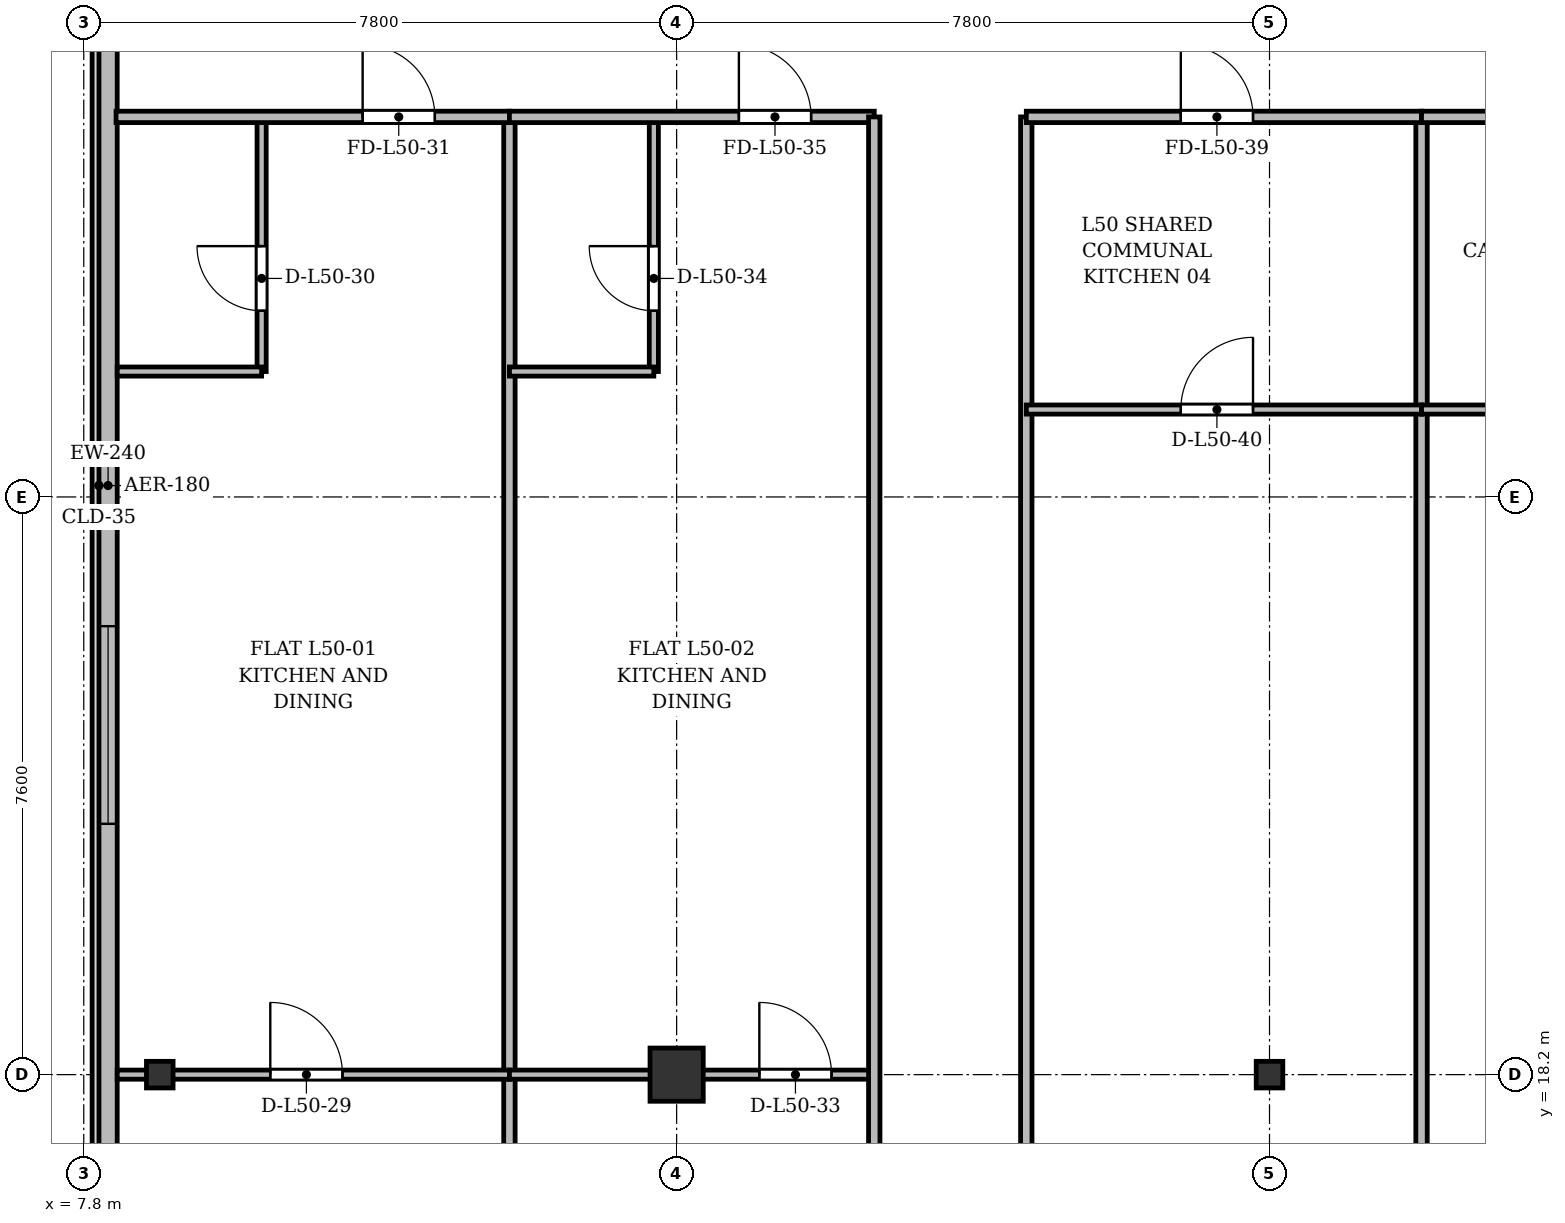
"""IFC4 building model, lengths in metres.
Left out: names, types, materials, properties, quantities, classifications, styles, units other than length and angle.
Written with IfcOpenShell. Run it as: python <this file> out.ifc"""

import sys

from ifc_helpers import new_model, si_unit, direction, frame, frame_2d, origin, origin_2d, place, context, subcontext, project, spatial, rectangle, i_section, extrude, source, transform, mapped, element, fill, save


model = new_model("IFC4")
c1 = context("Model", 3, precision=1e-05, world=origin(), true_north=direction((0.0, 1.0)))
c2 = subcontext(c1, "Body", "Model", "MODEL_VIEW")
j1 = project(units=[si_unit("LENGTHUNIT", "METRE"), si_unit("PLANEANGLEUNIT", "RADIAN")], contexts=[c1])
p1 = place(None, origin())
s1 = spatial("IfcSite", under=j1, at=p1, CompositionType="ELEMENT")
p2 = place(p1, origin())
s2 = spatial("IfcBuilding", under=s1, at=p2, CompositionType="ELEMENT")
p3 = place(p2, frame((0.0, 0.0, 194.1)))
s3 = spatial("IfcBuildingStorey", under=s2, at=p3, CompositionType="ELEMENT", Elevation=194.1)
m1 = source(origin(), c2, "Body", "SweptSolid", [
    extrude(i_section(OverallWidth=0.35, OverallDepth=0.35, WebThickness=0.018, FlangeThickness=0.028, at=origin_2d()), origin(), (0.0, 0.0, 1.0), 3.6),
])
p4 = place(p3, frame((8.8, 18.2, 0.0), z_axis=(0.0, 0.0, 1.0), x_axis=(1.0, 0.0, 0.0)))
e1 = element("IfcColumn", 1, at=p4, inside=s3, PredefinedType="COLUMN", context=c2, shape_type="MappedRepresentation", body=[
    mapped(m1, transform((0.0, 0.0, 0.0), x_axis=(1.0, 0.0, 0.0), y_axis=(0.0, 1.0, 0.0), z_axis=(0.0, 0.0, 1.0), scale=1.0)),
])
m2 = source(origin(), c2, "Body", "SweptSolid", [
    extrude(rectangle(XDim=0.7, YDim=0.7, at=origin_2d()), origin(), (0.0, 0.0, 1.0), 3.6),
])
p5 = place(p3, frame((15.6, 18.2, 0.0), z_axis=(0.0, 0.0, 1.0), x_axis=(1.0, 0.0, 0.0)))
e2 = element("IfcColumn", 2, at=p5, inside=s3, PredefinedType="COLUMN", context=c2, shape_type="MappedRepresentation", body=[
    mapped(m2, transform((0.0, 0.0, 0.0), x_axis=(1.0, 0.0, 0.0), y_axis=(0.0, 1.0, 0.0), z_axis=(0.0, 0.0, 1.0), scale=1.0)),
])
p6 = place(p3, frame((23.4, 18.2, 0.0), z_axis=(0.0, 0.0, 1.0), x_axis=(1.0, 0.0, 0.0)))
e3 = element("IfcColumn", 3, at=p6, inside=s3, PredefinedType="COLUMN", context=c2, shape_type="MappedRepresentation", body=[
    mapped(m1, transform((0.0, 0.0, 0.0), x_axis=(1.0, 0.0, 0.0), y_axis=(0.0, 1.0, 0.0), z_axis=(0.0, 0.0, 1.0), scale=1.0)),
])
p7 = place(p3, frame((8.12, 6.4, 0.0), z_axis=(0.0, 0.0, 1.0), x_axis=(0.0, 1.0, 0.0)))
e4 = element("IfcWall", 4, at=p7, inside=s3, PredefinedType="SOLIDWALL", context=c2, shape_type="SweptSolid", body=[
    extrude(rectangle(XDim=39.1, YDim=0.24, at=frame_2d((19.55, 0.0))), origin(), (0.0, 0.0, 1.0), 3.36),
])
p8 = place(p7, frame((1.45, 0.0, 0.92)))
e5 = element("IfcOpeningElement", 5, at=p8, cuts=e4, PredefinedType="OPENING", context=c2, shape_type="SweptSolid", body=[
    extrude(rectangle(XDim=1.2, YDim=1.65, at=frame_2d((0.6, 0.825))), frame((0.0, 0.13, 0.0), z_axis=(0.0, -1.0, 0.0), x_axis=(1.0, 0.0, 0.0)), (0.0, 0.0, 1.0), 0.26),
])
p9 = place(p7, frame((3.7, 0.0, 0.92)))
e6 = element("IfcOpeningElement", 6, at=p9, cuts=e4, PredefinedType="OPENING", context=c2, shape_type="SweptSolid", body=[
    extrude(rectangle(XDim=2.6, YDim=1.9, at=frame_2d((1.3, 0.95))), frame((0.0, 0.13, 0.0), z_axis=(0.0, -1.0, 0.0), x_axis=(1.0, 0.0, 0.0)), (0.0, 0.0, 1.0), 0.26),
])
p10 = place(p7, frame((7.9, 0.0, 0.92)))
e7 = element("IfcOpeningElement", 7, at=p10, cuts=e4, PredefinedType="OPENING", context=c2, shape_type="SweptSolid", body=[
    extrude(rectangle(XDim=2.6, YDim=1.9, at=frame_2d((1.3, 0.95))), frame((0.0, 0.13, 0.0), z_axis=(0.0, -1.0, 0.0), x_axis=(1.0, 0.0, 0.0)), (0.0, 0.0, 1.0), 0.26),
])
p11 = place(p7, frame((15.1, 0.0, 0.92)))
e8 = element("IfcOpeningElement", 8, at=p11, cuts=e4, PredefinedType="OPENING", context=c2, shape_type="SweptSolid", body=[
    extrude(rectangle(XDim=2.6, YDim=1.9, at=frame_2d((1.3, 0.95))), frame((0.0, 0.13, 0.0), z_axis=(0.0, -1.0, 0.0), x_axis=(1.0, 0.0, 0.0)), (0.0, 0.0, 1.0), 0.26),
])
p12 = place(p7, frame((33.4, 0.0, 0.92)))
e9 = element("IfcOpeningElement", 9, at=p12, cuts=e4, PredefinedType="OPENING", context=c2, shape_type="SweptSolid", body=[
    extrude(rectangle(XDim=1.2, YDim=1.65, at=frame_2d((0.6, 0.825))), frame((0.0, 0.13, 0.0), z_axis=(0.0, -1.0, 0.0), x_axis=(1.0, 0.0, 0.0)), (0.0, 0.0, 1.0), 0.26),
])
p13 = place(p7, frame((36.75, 0.0, 0.92)))
e10 = element("IfcOpeningElement", 10, at=p13, cuts=e4, PredefinedType="OPENING", context=c2, shape_type="SweptSolid", body=[
    extrude(rectangle(XDim=1.2, YDim=1.65, at=frame_2d((0.6, 0.825))), frame((0.0, 0.13, 0.0), z_axis=(0.0, -1.0, 0.0), x_axis=(1.0, 0.0, 0.0)), (0.0, 0.0, 1.0), 0.26),
])
for number, where, z_axis, x_axis in (
    (11, (13.4, 3.625, 0.0), (0.0, 0.0, 1.0), (0.0, 1.0, 0.0)),
    (12, (25.4, 3.625, 0.0), (0.0, 0.0, 1.0), (0.0, 1.0, 0.0)),
):
    element("IfcWall", number, at=place(p3, frame(where, z_axis=z_axis, x_axis=x_axis)), inside=s3, PredefinedType="PARTITIONING", context=c2, shape_type="SweptSolid", body=[
        extrude(rectangle(XDim=27.175, YDim=0.15, at=frame_2d((13.587, 0.0))), origin(), (0.0, 0.0, 1.0), 2.91),
    ])
p14 = place(p3, frame((8.24, 18.2, 0.0), z_axis=(0.0, 0.0, 1.0), x_axis=(1.0, 0.0, 0.0)))
e13 = element("IfcWall", 13, at=p14, inside=s3, PredefinedType="PARTITIONING", context=c2, shape_type="SweptSolid", body=[
    extrude(rectangle(XDim=5.16, YDim=0.12, at=frame_2d((2.58, 0.0))), origin(), (0.0, 0.0, 1.0), 2.91),
])
p15 = place(p14, frame((2.014, 0.0, 0.0)))
e14 = element("IfcOpeningElement", 14, at=p15, cuts=e13, PredefinedType="OPENING", context=c2, shape_type="SweptSolid", body=[
    extrude(rectangle(XDim=0.95, YDim=2.15, at=frame_2d((0.475, 1.075))), frame((0.0, 0.07, 0.0), z_axis=(0.0, -1.0, 0.0), x_axis=(1.0, 0.0, 0.0)), (0.0, 0.0, 1.0), 0.14),
])
p16 = place(p3, frame((10.14, 27.45, 0.0), z_axis=(0.0, 0.0, 1.0), x_axis=(0.0, 1.0, 0.0)))
e15 = element("IfcWall", 15, at=p16, inside=s3, PredefinedType="PARTITIONING", context=c2, shape_type="SweptSolid", body=[
    extrude(rectangle(XDim=3.35, YDim=0.12, at=frame_2d((1.675, 0.0))), origin(), (0.0, 0.0, 1.0), 3.36),
])
p17 = place(p16, frame((0.8, 0.0, 0.0)))
e16 = element("IfcOpeningElement", 16, at=p17, cuts=e15, PredefinedType="OPENING", context=c2, shape_type="SweptSolid", body=[
    extrude(rectangle(XDim=0.85, YDim=2.1, at=frame_2d((0.425, 1.05))), frame((0.0, 0.07, 0.0), z_axis=(0.0, -1.0, 0.0), x_axis=(1.0, 0.0, 0.0)), (0.0, 0.0, 1.0), 0.14),
])
p18 = place(p3, frame((8.24, 27.45, 0.0), z_axis=(0.0, 0.0, 1.0), x_axis=(1.0, 0.0, 0.0)))
e17 = element("IfcWall", 17, at=p18, inside=s3, PredefinedType="PARTITIONING", context=c2, shape_type="SweptSolid", body=[
    extrude(rectangle(XDim=1.9, YDim=0.12, at=frame_2d((0.95, 0.0))), origin(), (0.0, 0.0, 1.0), 2.86),
])
p19 = place(p3, frame((8.225, 30.8, 0.0), z_axis=(0.0, 0.0, 1.0), x_axis=(1.0, 0.0, 0.0)))
e18 = element("IfcWall", 18, at=p19, inside=s3, PredefinedType="PARTITIONING", context=c2, shape_type="SweptSolid", body=[
    extrude(rectangle(XDim=5.175, YDim=0.15, at=frame_2d((2.587, 0.0))), origin(), (0.0, 0.0, 1.0), 2.86),
])
p20 = place(p19, frame((3.244, 0.0, 0.0)))
e19 = element("IfcOpeningElement", 19, at=p20, cuts=e18, PredefinedType="OPENING", context=c2, shape_type="SweptSolid", body=[
    extrude(rectangle(XDim=0.95, YDim=2.15, at=frame_2d((0.475, 1.075))), frame((0.0, 0.085, 0.0), z_axis=(0.0, -1.0, 0.0), x_axis=(1.0, 0.0, 0.0)), (0.0, 0.0, 1.0), 0.17),
])
p21 = place(p3, frame((13.4, 18.2, 0.0), z_axis=(0.0, 0.0, 1.0), x_axis=(1.0, 0.0, 0.0)))
e20 = element("IfcWall", 20, at=p21, inside=s3, PredefinedType="PARTITIONING", context=c2, shape_type="SweptSolid", body=[
    extrude(rectangle(XDim=4.8, YDim=0.12, at=frame_2d((2.4, 0.0))), origin(), (0.0, 0.0, 1.0), 2.91),
])
p22 = place(p21, frame((3.288, 0.0, 0.0)))
e21 = element("IfcOpeningElement", 21, at=p22, cuts=e20, PredefinedType="OPENING", context=c2, shape_type="SweptSolid", body=[
    extrude(rectangle(XDim=0.95, YDim=2.15, at=frame_2d((0.475, 1.075))), frame((0.0, 0.07, 0.0), z_axis=(0.0, -1.0, 0.0), x_axis=(1.0, 0.0, 0.0)), (0.0, 0.0, 1.0), 0.14),
])
p23 = place(p3, frame((15.3, 27.45, 0.0), z_axis=(0.0, 0.0, 1.0), x_axis=(0.0, 1.0, 0.0)))
e22 = element("IfcWall", 22, at=p23, inside=s3, PredefinedType="PARTITIONING", context=c2, shape_type="SweptSolid", body=[
    extrude(rectangle(XDim=3.35, YDim=0.12, at=frame_2d((1.675, 0.0))), origin(), (0.0, 0.0, 1.0), 3.36),
])
p24 = place(p23, frame((0.8, 0.0, 0.0)))
e23 = element("IfcOpeningElement", 23, at=p24, cuts=e22, PredefinedType="OPENING", context=c2, shape_type="SweptSolid", body=[
    extrude(rectangle(XDim=0.85, YDim=2.1, at=frame_2d((0.425, 1.05))), frame((0.0, 0.07, 0.0), z_axis=(0.0, -1.0, 0.0), x_axis=(1.0, 0.0, 0.0)), (0.0, 0.0, 1.0), 0.14),
])
p25 = place(p3, frame((13.4, 27.45, 0.0), z_axis=(0.0, 0.0, 1.0), x_axis=(1.0, 0.0, 0.0)))
e24 = element("IfcWall", 24, at=p25, inside=s3, PredefinedType="PARTITIONING", context=c2, shape_type="SweptSolid", body=[
    extrude(rectangle(XDim=1.9, YDim=0.12, at=frame_2d((0.95, 0.0))), origin(), (0.0, 0.0, 1.0), 3.36),
])
p26 = place(p3, frame((13.4, 30.8, 0.0), z_axis=(0.0, 0.0, 1.0), x_axis=(1.0, 0.0, 0.0)))
e25 = element("IfcWall", 25, at=p26, inside=s3, PredefinedType="PARTITIONING", context=c2, shape_type="SweptSolid", body=[
    extrude(rectangle(XDim=4.8, YDim=0.15, at=frame_2d((2.4, 0.0))), origin(), (0.0, 0.0, 1.0), 2.86),
])
p27 = place(p26, frame((3.019, 0.0, 0.0)))
e26 = element("IfcOpeningElement", 26, at=p27, cuts=e25, PredefinedType="OPENING", context=c2, shape_type="SweptSolid", body=[
    extrude(rectangle(XDim=0.95, YDim=2.15, at=frame_2d((0.475, 1.075))), frame((0.0, 0.085, 0.0), z_axis=(0.0, -1.0, 0.0), x_axis=(1.0, 0.0, 0.0)), (0.0, 0.0, 1.0), 0.17),
])
for number, where, z_axis, x_axis in (
    (27, (18.2, 3.625, 0.0), (0.0, 0.0, 1.0), (0.0, 1.0, 0.0)),
    (28, (20.2, 3.625, 0.0), (0.0, 0.0, 1.0), (0.0, 1.0, 0.0)),
):
    element("IfcWall", number, at=place(p3, frame(where, z_axis=z_axis, x_axis=x_axis)), inside=s3, PredefinedType="PARTITIONING", context=c2, shape_type="SweptSolid", body=[
        extrude(rectangle(XDim=27.175, YDim=0.15, at=frame_2d((13.587, 0.0))), origin(), (0.0, 0.0, 1.0), 2.91),
    ])
p28 = place(p3, frame((20.2, 30.8, 0.0), z_axis=(0.0, 0.0, 1.0), x_axis=(1.0, 0.0, 0.0)))
e29 = element("IfcWall", 29, at=p28, inside=s3, PredefinedType="PARTITIONING", context=c2, shape_type="SweptSolid", body=[
    extrude(rectangle(XDim=5.2, YDim=0.15, at=frame_2d((2.6, 0.0))), origin(), (0.0, 0.0, 1.0), 2.86),
])
p29 = place(p28, frame((2.033, 0.0, 0.0)))
e30 = element("IfcOpeningElement", 30, at=p29, cuts=e29, PredefinedType="OPENING", context=c2, shape_type="SweptSolid", body=[
    extrude(rectangle(XDim=0.95, YDim=2.15, at=frame_2d((0.475, 1.075))), frame((0.0, 0.085, 0.0), z_axis=(0.0, -1.0, 0.0), x_axis=(1.0, 0.0, 0.0)), (0.0, 0.0, 1.0), 0.17),
])
p30 = place(p3, frame((20.2, 26.95, 0.0), z_axis=(0.0, 0.0, 1.0), x_axis=(1.0, 0.0, 0.0)))
e31 = element("IfcWall", 31, at=p30, inside=s3, PredefinedType="PARTITIONING", context=c2, shape_type="SweptSolid", body=[
    extrude(rectangle(XDim=5.2, YDim=0.12, at=frame_2d((2.6, 0.0))), origin(), (0.0, 0.0, 1.0), 2.86),
])
p31 = place(p30, frame((2.033, 0.0, 0.0)))
e32 = element("IfcOpeningElement", 32, at=p31, cuts=e31, PredefinedType="OPENING", context=c2, shape_type="SweptSolid", body=[
    extrude(rectangle(XDim=0.95, YDim=2.15, at=frame_2d((0.475, 1.075))), frame((0.0, 0.07, 0.0), z_axis=(0.0, -1.0, 0.0), x_axis=(1.0, 0.0, 0.0)), (0.0, 0.0, 1.0), 0.14),
])
p32 = place(p3, frame((25.4, 30.8, 0.0), z_axis=(0.0, 0.0, 1.0), x_axis=(1.0, 0.0, 0.0)))
e33 = element("IfcWall", 33, at=p32, inside=s3, PredefinedType="PARTITIONING", context=c2, shape_type="SweptSolid", body=[
    extrude(rectangle(XDim=5.0, YDim=0.15, at=frame_2d((2.5, 0.0))), origin(), (0.0, 0.0, 1.0), 3.36),
])
p33 = place(p32, frame((2.025, 0.0, 0.0)))
e34 = element("IfcOpeningElement", 34, at=p33, cuts=e33, PredefinedType="OPENING", context=c2, shape_type="SweptSolid", body=[
    extrude(rectangle(XDim=0.95, YDim=2.15, at=frame_2d((0.475, 1.075))), frame((0.0, 0.085, 0.0), z_axis=(0.0, -1.0, 0.0), x_axis=(1.0, 0.0, 0.0)), (0.0, 0.0, 1.0), 0.17),
])
p34 = place(p3, frame((25.4, 26.95, 0.0), z_axis=(0.0, 0.0, 1.0), x_axis=(1.0, 0.0, 0.0)))
e35 = element("IfcWall", 35, at=p34, inside=s3, PredefinedType="PARTITIONING", context=c2, shape_type="SweptSolid", body=[
    extrude(rectangle(XDim=4.975, YDim=0.12, at=frame_2d((2.488, 0.0))), origin(), (0.0, 0.0, 1.0), 3.36),
])
p35 = place(p34, frame((2.013, 0.0, 0.0)))
e36 = element("IfcOpeningElement", 36, at=p35, cuts=e35, PredefinedType="OPENING", context=c2, shape_type="SweptSolid", body=[
    extrude(rectangle(XDim=0.95, YDim=2.15, at=frame_2d((0.475, 1.075))), frame((0.0, 0.07, 0.0), z_axis=(0.0, -1.0, 0.0), x_axis=(1.0, 0.0, 0.0)), (0.0, 0.0, 1.0), 0.14),
])
m3 = source(origin(), c2, "Body", "SweptSolid", [
    extrude(rectangle(XDim=2.6, YDim=1.9, at=frame_2d((1.3, 0.95))), frame((0.0, 0.03, 0.0), z_axis=(0.0, -1.0, 0.0), x_axis=(1.0, 0.0, 0.0)), (0.0, 0.0, 1.0), 0.06),
])
p36 = place(p11, origin())
e37 = element("IfcWindow", 37, at=p36, inside=s3, PartitioningType="SINGLE_PANEL", PredefinedType="WINDOW", context=c2, shape_type="MappedRepresentation", body=[
    mapped(m3, transform((0.0, 0.0, 0.0), x_axis=(1.0, 0.0, 0.0), y_axis=(0.0, 1.0, 0.0), z_axis=(0.0, 0.0, 1.0), scale=1.0)),
])
fill(e8, e37)
m4 = source(origin(), c2, "Body", "SweptSolid", [
    extrude(rectangle(XDim=0.95, YDim=2.15, at=frame_2d((0.475, 1.075))), frame((0.0, 0.025, 0.0), z_axis=(0.0, -1.0, 0.0), x_axis=(1.0, 0.0, 0.0)), (0.0, 0.0, 1.0), 0.05),
])
p37 = place(p15, origin())
e38 = element("IfcDoor", 38, at=p37, inside=s3, OperationType="SINGLE_SWING_LEFT", PredefinedType="DOOR", context=c2, shape_type="MappedRepresentation", body=[
    mapped(m4, transform((0.0, 0.0, 0.0), x_axis=(1.0, 0.0, 0.0), y_axis=(0.0, 1.0, 0.0), z_axis=(0.0, 0.0, 1.0), scale=1.0)),
])
fill(e14, e38)
m5 = source(origin(), c2, "Body", "SweptSolid", [
    extrude(rectangle(XDim=0.85, YDim=2.1, at=frame_2d((0.425, 1.05))), frame((0.0, 0.025, 0.0), z_axis=(0.0, -1.0, 0.0), x_axis=(1.0, 0.0, 0.0)), (0.0, 0.0, 1.0), 0.05),
])
p38 = place(p17, origin())
e39 = element("IfcDoor", 39, at=p38, inside=s3, OperationType="SINGLE_SWING_RIGHT", PredefinedType="DOOR", context=c2, shape_type="MappedRepresentation", body=[
    mapped(m5, transform((0.0, 0.0, 0.0), x_axis=(1.0, 0.0, 0.0), y_axis=(0.0, 1.0, 0.0), z_axis=(0.0, 0.0, 1.0), scale=1.0)),
])
fill(e16, e39)
p39 = place(p20, origin())
e40 = element("IfcDoor", 40, at=p39, inside=s3, OperationType="SINGLE_SWING_LEFT", PredefinedType="DOOR", context=c2, shape_type="MappedRepresentation", body=[
    mapped(m4, transform((0.0, 0.0, 0.0), x_axis=(1.0, 0.0, 0.0), y_axis=(0.0, 1.0, 0.0), z_axis=(0.0, 0.0, 1.0), scale=1.0)),
])
fill(e19, e40)
p40 = place(p22, origin())
e41 = element("IfcDoor", 41, at=p40, inside=s3, OperationType="SINGLE_SWING_LEFT", PredefinedType="DOOR", context=c2, shape_type="MappedRepresentation", body=[
    mapped(m4, transform((0.0, 0.0, 0.0), x_axis=(1.0, 0.0, 0.0), y_axis=(0.0, 1.0, 0.0), z_axis=(0.0, 0.0, 1.0), scale=1.0)),
])
fill(e21, e41)
p41 = place(p24, origin())
e42 = element("IfcDoor", 42, at=p41, inside=s3, OperationType="SINGLE_SWING_RIGHT", PredefinedType="DOOR", context=c2, shape_type="MappedRepresentation", body=[
    mapped(m5, transform((0.0, 0.0, 0.0), x_axis=(1.0, 0.0, 0.0), y_axis=(0.0, 1.0, 0.0), z_axis=(0.0, 0.0, 1.0), scale=1.0)),
])
fill(e23, e42)
p42 = place(p27, origin())
e43 = element("IfcDoor", 43, at=p42, inside=s3, OperationType="SINGLE_SWING_LEFT", PredefinedType="DOOR", context=c2, shape_type="MappedRepresentation", body=[
    mapped(m4, transform((0.0, 0.0, 0.0), x_axis=(1.0, 0.0, 0.0), y_axis=(0.0, 1.0, 0.0), z_axis=(0.0, 0.0, 1.0), scale=1.0)),
])
fill(e26, e43)
p43 = place(p29, origin())
e44 = element("IfcDoor", 44, at=p43, inside=s3, OperationType="SINGLE_SWING_LEFT", PredefinedType="DOOR", context=c2, shape_type="MappedRepresentation", body=[
    mapped(m4, transform((0.0, 0.0, 0.0), x_axis=(1.0, 0.0, 0.0), y_axis=(0.0, 1.0, 0.0), z_axis=(0.0, 0.0, 1.0), scale=1.0)),
])
fill(e30, e44)
p44 = place(p31, origin())
e45 = element("IfcDoor", 45, at=p44, inside=s3, OperationType="SINGLE_SWING_RIGHT", PredefinedType="DOOR", context=c2, shape_type="MappedRepresentation", body=[
    mapped(m4, transform((0.0, 0.0, 0.0), x_axis=(1.0, 0.0, 0.0), y_axis=(0.0, 1.0, 0.0), z_axis=(0.0, 0.0, 1.0), scale=1.0)),
])
fill(e32, e45)
save(model, sys.argv[1])
